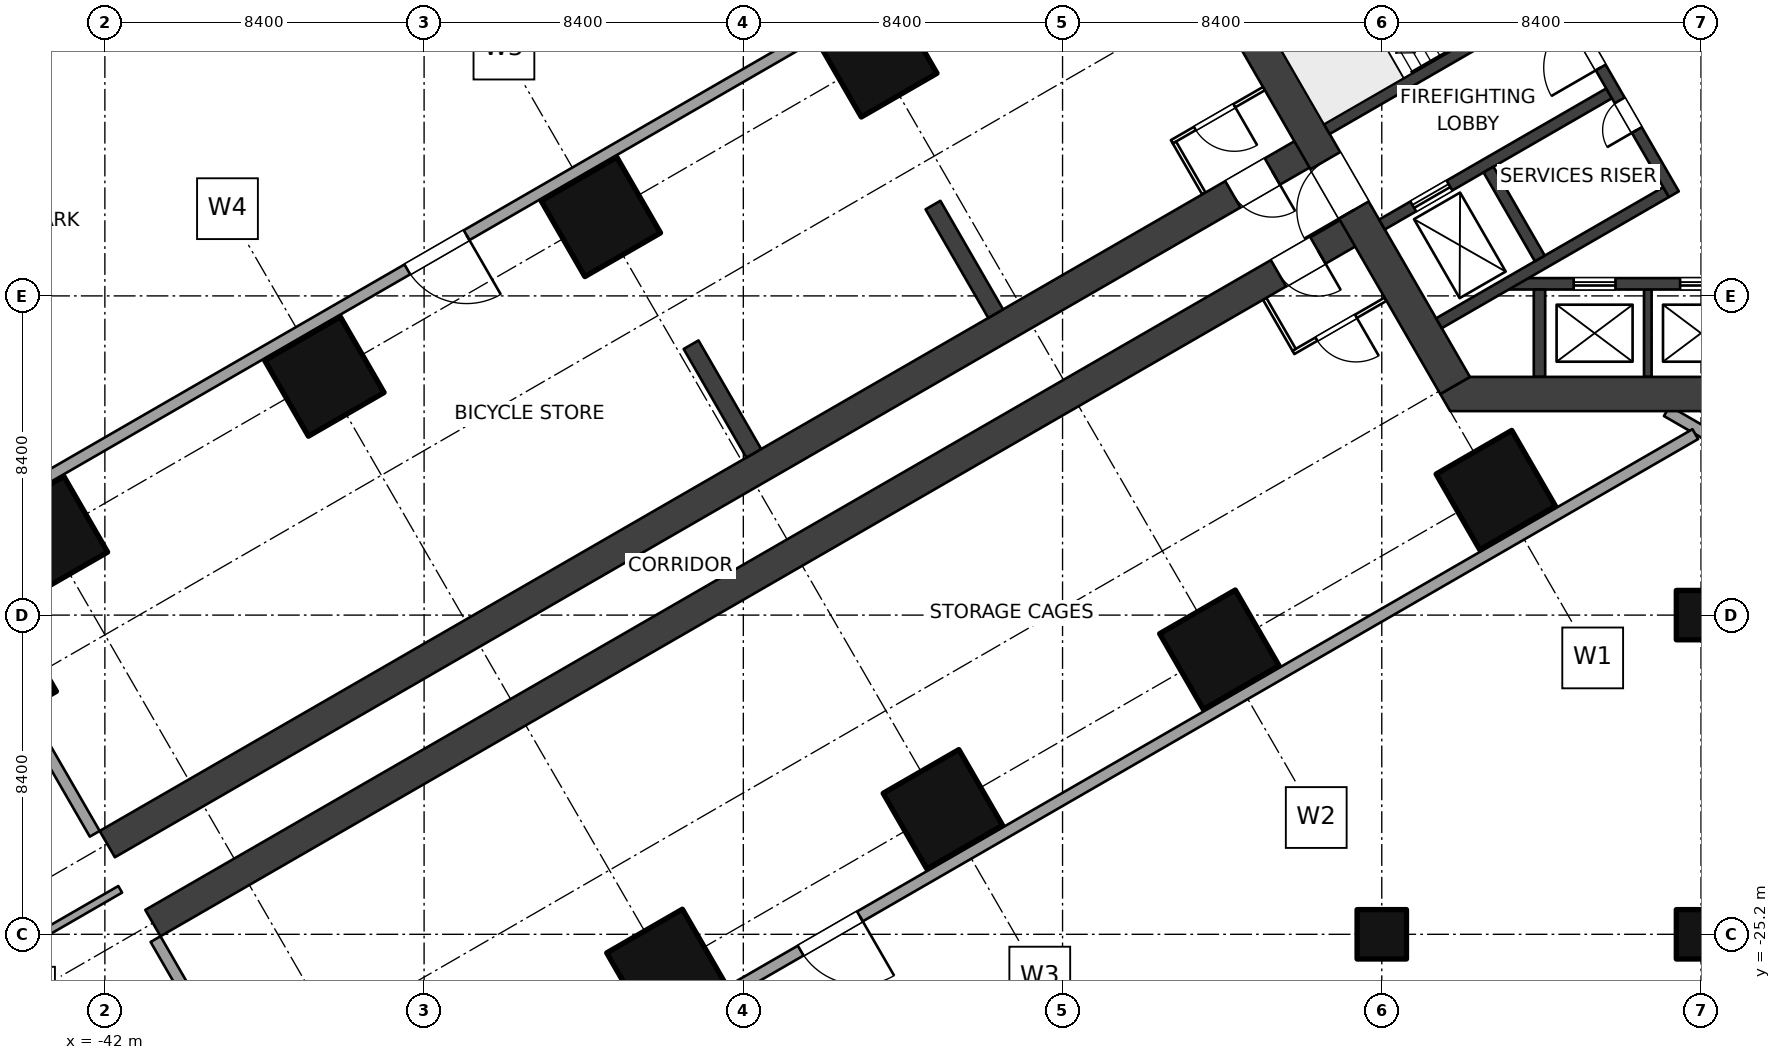
"""IFC4 building model, lengths in metres.
Left out: names, types, materials, properties, quantities, classifications, styles, units other than length and angle.
Written with IfcOpenShell. Run it as: python <this file> out.ifc"""

import sys

from ifc_helpers import new_model, si_unit, direction, frame, frame_2d, origin, origin_2d, place, context, subcontext, project, spatial, polyline, rectangle, outline, extrude, element, fill, save


model = new_model("IFC4")
c1 = context("Model", 3, precision=1e-05, world=origin(), true_north=direction((0.0, 1.0)))
c2 = subcontext(c1, "Body", "Model", "MODEL_VIEW")
j1 = project(units=[si_unit("LENGTHUNIT", "METRE"), si_unit("PLANEANGLEUNIT", "RADIAN")], contexts=[c1])
p1 = place(None, origin())
s1 = spatial("IfcSite", under=j1, at=p1, CompositionType="ELEMENT")
p2 = place(p1, origin())
s2 = spatial("IfcBuilding", under=s1, at=p2, CompositionType="ELEMENT")
p3 = place(p2, frame((0.0, 0.0, -7.0)))
s3 = spatial("IfcBuildingStorey", under=s2, at=p3, CompositionType="ELEMENT", Elevation=-7.0)
for number, where, z_axis, x_axis in (
    (1, (-5.4, -13.51, 0.0), (0.0, 0.0, 1.0), (-0.5, 0.866, 0.0)),
    (2, (-12.675, -17.71, 0.0), (0.0, 0.0, 1.0), (-0.5, 0.866, 0.0)),
    (3, (-21.675, -2.122, 0.0), (0.0, 0.0, 1.0), (-0.5, 0.866, 0.0)),
    (4, (-19.949, -21.91, 0.0), (0.0, 0.0, 1.0), (-0.5, 0.866, 0.0)),
    (5, (-28.949, -6.322, 0.0), (0.0, 0.0, 1.0), (-0.5, 0.866, 0.0)),
    (6, (-27.224, -26.11, 0.0), (0.0, 0.0, 1.0), (-0.5, 0.866, 0.0)),
    (7, (-36.224, -10.521, 0.0), (0.0, 0.0, 1.0), (-0.5, 0.866, 0.0)),
    (8, (-43.499, -14.721, 0.0), (0.0, 0.0, 1.0), (-0.5, 0.866, 0.0)),
):
    element("IfcColumn", number, at=place(p3, frame(where, z_axis=z_axis, x_axis=x_axis)), inside=s3, PredefinedType="COLUMN", context=c2, shape_type="SweptSolid", body=[
        extrude(rectangle(XDim=2.3, YDim=2.3, at=origin_2d()), origin(), (0.0, 0.0, 1.0), 3.5),
    ])
for number, where, z_axis, x_axis in (
    (9, (-44.164, -18.57, 0.0), (0.0, 0.0, 1.0), (-0.5, 0.866, 0.0)),
    (10, (-8.4, -25.2, 0.0), (0.0, 0.0, 1.0), (1.0, 0.0, 0.0)),
    (11, (0.0, -25.2, 0.0), (0.0, 0.0, 1.0), (1.0, 0.0, 0.0)),
    (12, (0.0, -16.8, 0.0), (0.0, 0.0, 1.0), (1.0, 0.0, 0.0)),
):
    element("IfcColumn", number, at=place(p3, frame(where, z_axis=z_axis, x_axis=x_axis)), inside=s3, PredefinedType="COLUMN", context=c2, shape_type="SweptSolid", body=[
        extrude(rectangle(XDim=1.3, YDim=1.3, at=origin_2d()), origin(), (0.0, 0.0, 1.0), 3.5),
    ])
p4 = place(p3, frame((-6.47, -10.757, 0.0), z_axis=(0.0, 0.0, 1.0), x_axis=(-0.499997612506, 0.8660267822, 0.0)))
e13 = element("IfcWall", 13, at=p4, inside=s3, PredefinedType="SHEAR", context=c2, shape_type="SweptSolid", body=[
    extrude(rectangle(XDim=12.161, YDim=0.9, at=frame_2d((6.08, 0.0))), origin(), (0.0, 0.0, 1.0), 3.5),
])
p5 = place(p4, frame((5.33, 0.0, 0.0)))
e14 = element("IfcOpeningElement", 14, at=p5, cuts=e13, PredefinedType="OPENING", context=c2, shape_type="SweptSolid", body=[
    extrude(rectangle(XDim=1.5, YDim=2.1, at=frame_2d((0.75, 1.05))), frame((0.0, 0.46, 0.0), z_axis=(0.0, -1.0, 0.0), x_axis=(1.0, 0.0, 0.0)), (0.0, 0.0, 1.0), 0.92),
])
p6 = place(p3, origin())
e15 = element("IfcWall", 15, at=p6, inside=s3, PredefinedType="SHEAR", context=c2, shape_type="SweptSolid", body=[
    extrude(outline(polyline([(-6.6, -11.432), (6.6, -11.432), (6.86, -10.981), (6.08, -10.531), (-6.08, -10.531), (-6.86, -10.981), (-6.6, -11.432)])), origin(), (0.0, 0.0, 1.0), 3.5),
])
p7 = place(p3, frame((-0.714, -5.724, 0.0), z_axis=(0.0, 0.0, 1.0), x_axis=(-0.499995050369, 0.866028261437, 0.0)))
e16 = element("IfcWall", 16, at=p7, inside=s3, PredefinedType="SHEAR", context=c2, shape_type="SweptSolid", body=[
    extrude(rectangle(XDim=9.2, YDim=0.3, at=frame_2d((4.6, 0.0))), origin(), (0.0, 0.0, 1.0), 3.5),
])
p8 = place(p7, frame((3.85, 0.0, 0.0)))
e17 = element("IfcOpeningElement", 17, at=p8, cuts=e16, PredefinedType="OPENING", context=c2, shape_type="SweptSolid", body=[
    extrude(rectangle(XDim=1.5, YDim=2.1, at=frame_2d((0.75, 1.05))), frame((0.0, 0.16, 0.0), z_axis=(0.0, -1.0, 0.0), x_axis=(1.0, 0.0, 0.0)), (0.0, 0.0, 1.0), 0.32),
])
p9 = place(p7, frame((1.95, 0.0, 0.0)))
e18 = element("IfcOpeningElement", 18, at=p9, cuts=e16, PredefinedType="OPENING", context=c2, shape_type="SweptSolid", body=[
    extrude(rectangle(XDim=0.9, YDim=2.1, at=frame_2d((0.45, 1.05))), frame((0.0, 0.16, 0.0), z_axis=(0.0, -1.0, 0.0), x_axis=(1.0, 0.0, 0.0)), (0.0, 0.0, 1.0), 0.32),
])
p10 = place(p3, frame((-3.869, -0.559, 0.0), z_axis=(0.0, 0.0, 1.0), x_axis=(-0.86602711848, -0.499997030048, 0.0)))
e19 = element("IfcWall", 19, at=p10, inside=s3, PredefinedType="SHEAR", context=c2, shape_type="SweptSolid", body=[
    extrude(rectangle(XDim=6.901, YDim=0.3, at=frame_2d((3.451, 0.0))), origin(), (0.0, 0.0, 1.0), 3.5),
])
p11 = place(p10, frame((0.25, 0.0, 0.0)))
e20 = element("IfcOpeningElement", 20, at=p11, cuts=e19, PredefinedType="OPENING", context=c2, shape_type="SweptSolid", body=[
    extrude(rectangle(XDim=1.0, YDim=2.1, at=frame_2d((0.5, 1.05))), frame((0.0, 0.16, 0.0), z_axis=(0.0, -1.0, 0.0), x_axis=(1.0, 0.0, 0.0)), (0.0, 0.0, 1.0), 0.32),
])
p12 = place(p3, frame((-2.419, -3.071, 0.0), z_axis=(0.0, 0.0, 1.0), x_axis=(-0.86602711848, -0.499997030048, 0.0)))
e21 = element("IfcWall", 21, at=p12, inside=s3, PredefinedType="SHEAR", context=c2, shape_type="SweptSolid", body=[
    extrude(rectangle(XDim=6.901, YDim=0.3, at=frame_2d((3.451, 0.0))), origin(), (0.0, 0.0, 1.0), 3.5),
])
p13 = place(p12, frame((4.85, 0.0, 0.0)))
e22 = element("IfcOpeningElement", 22, at=p13, cuts=e21, PredefinedType="OPENING", context=c2, shape_type="SweptSolid", body=[
    extrude(rectangle(XDim=1.1, YDim=2.1, at=frame_2d((0.55, 1.05))), frame((0.0, 0.16, 0.0), z_axis=(0.0, -1.0, 0.0), x_axis=(1.0, 0.0, 0.0)), (0.0, 0.0, 1.0), 0.32),
])
p14 = place(p3, frame((-0.919, -5.669, 0.0), z_axis=(0.0, 0.0, 1.0), x_axis=(-0.866011800373, -0.500023561059, 0.0)))
e23 = element("IfcWall", 23, at=p14, inside=s3, PredefinedType="SHEAR", context=c2, shape_type="SweptSolid", body=[
    extrude(rectangle(XDim=6.902, YDim=0.3, at=frame_2d((3.451, 0.0))), origin(), (0.0, 0.0, 1.0), 3.5),
])
p15 = place(p3, frame((-4.241, -7.414, 0.0), z_axis=(0.0, 0.0, 1.0), x_axis=(-0.500048589285, 0.86599734893, 0.0)))
e24 = element("IfcWall", 24, at=p15, inside=s3, PredefinedType="SHEAR", context=c2, shape_type="SweptSolid", body=[
    extrude(rectangle(XDim=2.7, YDim=0.3, at=frame_2d((1.35, 0.0))), origin(), (0.0, 0.0, 1.0), 3.5),
])
p16 = place(p3, frame((5.098, -8.082, 0.0), z_axis=(0.0, 0.0, 1.0), x_axis=(-1.0, 0.0, 0.0)))
e25 = element("IfcWall", 25, at=p16, inside=s3, PredefinedType="SHEAR", context=c2, shape_type="SweptSolid", body=[
    extrude(rectangle(XDim=10.195, YDim=0.3, at=frame_2d((5.098, 0.0))), origin(), (0.0, 0.0, 1.0), 3.5),
])
p17 = place(p16, frame((1.748, 0.0, 0.0)))
e26 = element("IfcOpeningElement", 26, at=p17, cuts=e25, PredefinedType="OPENING", context=c2, shape_type="SweptSolid", body=[
    extrude(rectangle(XDim=1.1, YDim=2.1, at=frame_2d((0.55, 1.05))), frame((0.0, 0.16, 0.0), z_axis=(0.0, -1.0, 0.0), x_axis=(1.0, 0.0, 0.0)), (0.0, 0.0, 1.0), 0.32),
])
p18 = place(p16, frame((4.548, 0.0, 0.0)))
e27 = element("IfcOpeningElement", 27, at=p18, cuts=e25, PredefinedType="OPENING", context=c2, shape_type="SweptSolid", body=[
    extrude(rectangle(XDim=1.1, YDim=2.1, at=frame_2d((0.55, 1.05))), frame((0.0, 0.16, 0.0), z_axis=(0.0, -1.0, 0.0), x_axis=(1.0, 0.0, 0.0)), (0.0, 0.0, 1.0), 0.32),
])
p19 = place(p16, frame((7.348, 0.0, 0.0)))
e28 = element("IfcOpeningElement", 28, at=p19, cuts=e25, PredefinedType="OPENING", context=c2, shape_type="SweptSolid", body=[
    extrude(rectangle(XDim=1.1, YDim=2.1, at=frame_2d((0.55, 1.05))), frame((0.0, 0.16, 0.0), z_axis=(0.0, -1.0, 0.0), x_axis=(1.0, 0.0, 0.0)), (0.0, 0.0, 1.0), 0.32),
])
p20 = place(p3, frame((-4.25, -8.231, 0.0), z_axis=(0.0, 0.0, 1.0), x_axis=(0.0, -1.0, 0.0)))
e29 = element("IfcWall", 29, at=p20, inside=s3, PredefinedType="SHEAR", context=c2, shape_type="SweptSolid", body=[
    extrude(rectangle(XDim=2.3, YDim=0.3, at=frame_2d((1.15, 0.0))), origin(), (0.0, 0.0, 1.0), 3.5),
])
p21 = place(p3, frame((-1.4, -8.231, 0.0), z_axis=(0.0, 0.0, 1.0), x_axis=(0.0, -1.0, 0.0)))
e30 = element("IfcWall", 30, at=p21, inside=s3, PredefinedType="SHEAR", context=c2, shape_type="SweptSolid", body=[
    extrude(rectangle(XDim=2.3, YDim=0.2, at=frame_2d((1.15, 0.0))), origin(), (0.0, 0.0, 1.0), 3.5),
])
p22 = place(p3, frame((-8.91, -6.53, 0.0), z_axis=(0.0, 0.0, 1.0), x_axis=(-0.866025284237, -0.500000207062, 0.0)))
e31 = element("IfcWall", 31, at=p22, inside=s3, PredefinedType="SHEAR", context=c2, shape_type="SweptSolid", body=[
    extrude(rectangle(XDim=36.75, YDim=0.8, at=frame_2d((18.375, 0.0))), origin(), (0.0, 0.0, 1.0), 3.5),
])
p23 = place(p22, frame((1.35, 0.0, 0.0)))
e32 = element("IfcOpeningElement", 32, at=p23, cuts=e31, PredefinedType="OPENING", context=c2, shape_type="SweptSolid", body=[
    extrude(rectangle(XDim=1.2, YDim=2.1, at=frame_2d((0.6, 1.05))), frame((0.0, 0.41, 0.0), z_axis=(0.0, -1.0, 0.0), x_axis=(1.0, 0.0, 0.0)), (0.0, 0.0, 1.0), 0.82),
])
p24 = place(p3, frame((-10.11, -4.451, 0.0), z_axis=(0.0, 0.0, 1.0), x_axis=(-0.866025284237, -0.500000207062, 0.0)))
e33 = element("IfcWall", 33, at=p24, inside=s3, PredefinedType="SHEAR", context=c2, shape_type="SweptSolid", body=[
    extrude(rectangle(XDim=36.75, YDim=0.8, at=frame_2d((18.375, 0.0))), origin(), (0.0, 0.0, 1.0), 3.5),
])
p25 = place(p24, frame((1.35, 0.0, 0.0)))
e34 = element("IfcOpeningElement", 34, at=p25, cuts=e33, PredefinedType="OPENING", context=c2, shape_type="SweptSolid", body=[
    extrude(rectangle(XDim=1.2, YDim=2.1, at=frame_2d((0.6, 1.05))), frame((0.0, 0.41, 0.0), z_axis=(0.0, -1.0, 0.0), x_axis=(1.0, 0.0, 0.0)), (0.0, 0.0, 1.0), 0.82),
])
p26 = place(p3, frame((-8.3, -8.487, 0.0), z_axis=(0.0, 0.0, 1.0), x_axis=(-0.866034573852, -0.49998411664, 0.0)))
e35 = element("IfcWall", 35, at=p26, inside=s3, PredefinedType="PARTITIONING", context=c2, shape_type="SweptSolid", body=[
    extrude(rectangle(XDim=2.8, YDim=0.1, at=frame_2d((1.4, 0.0))), origin(), (0.0, 0.0, 1.0), 3.2),
])
p27 = place(p26, frame((0.9, 0.0, 0.0)))
e36 = element("IfcOpeningElement", 36, at=p27, cuts=e35, PredefinedType="OPENING", context=c2, shape_type="SweptSolid", body=[
    extrude(rectangle(XDim=1.2, YDim=2.1, at=frame_2d((0.6, 1.05))), frame((0.0, 0.06, 0.0), z_axis=(0.0, -1.0, 0.0), x_axis=(1.0, 0.0, 0.0)), (0.0, 0.0, 1.0), 0.12),
])
p28 = place(p3, frame((-11.482, -8.476, 0.0), z_axis=(0.0, 0.0, 1.0), x_axis=(0.500017819788, -0.86601511528, 0.0)))
e37 = element("IfcWall", 37, at=p28, inside=s3, PredefinedType="PARTITIONING", context=c2, shape_type="SweptSolid", body=[
    extrude(rectangle(XDim=1.55, YDim=0.1, at=frame_2d((0.775, 0.0))), origin(), (0.0, 0.0, 1.0), 3.2),
])
p29 = place(p3, frame((-11.5, -2.945, 0.0), z_axis=(0.0, 0.0, 1.0), x_axis=(-0.866034573852, -0.49998411664, 0.0)))
e38 = element("IfcWall", 38, at=p29, inside=s3, PredefinedType="PARTITIONING", context=c2, shape_type="SweptSolid", body=[
    extrude(rectangle(XDim=2.8, YDim=0.1, at=frame_2d((1.4, 0.0))), origin(), (0.0, 0.0, 1.0), 3.2),
])
p30 = place(p29, frame((0.9, 0.0, 0.0)))
e39 = element("IfcOpeningElement", 39, at=p30, cuts=e38, PredefinedType="OPENING", context=c2, shape_type="SweptSolid", body=[
    extrude(rectangle(XDim=1.2, YDim=2.1, at=frame_2d((0.6, 1.05))), frame((0.0, 0.06, 0.0), z_axis=(0.0, -1.0, 0.0), x_axis=(1.0, 0.0, 0.0)), (0.0, 0.0, 1.0), 0.12),
])
p31 = place(p3, frame((-13.082, -5.705, 0.0), z_axis=(0.0, 0.0, 1.0), x_axis=(-0.500086022567, 0.865975732936, 0.0)))
e40 = element("IfcWall", 40, at=p31, inside=s3, PredefinedType="PARTITIONING", context=c2, shape_type="SweptSolid", body=[
    extrude(rectangle(XDim=1.55, YDim=0.1, at=frame_2d((0.775, 0.0))), origin(), (0.0, 0.0, 1.0), 3.2),
])
p32 = place(p3, frame((-41.596, -24.016, 0.0), z_axis=(0.0, 0.0, 1.0), x_axis=(-0.866034858292, -0.499983623955, 0.0)))
e41 = element("IfcWall", 41, at=p32, inside=s3, PredefinedType="SOLIDWALL", context=c2, shape_type="SweptSolid", body=[
    extrude(rectangle(XDim=10.627, YDim=0.2, at=frame_2d((5.313, 0.0))), origin(), (0.0, 0.0, 1.0), 3.2),
])
for number, where, z_axis, x_axis in (
    (42, (-40.667, -25.326, 0.0), (0.0, 0.0, 1.0), (0.5, -0.866, 0.0)),
    (43, (-42.267, -22.555, 0.0), (0.0, 0.0, 1.0), (-0.5, 0.866, 0.0)),
):
    element("IfcWall", number, at=place(p3, frame(where, z_axis=z_axis, x_axis=x_axis)), inside=s3, PredefinedType="SOLIDWALL", context=c2, shape_type="SweptSolid", body=[
        extrude(rectangle(XDim=8.6, YDim=0.3, at=frame_2d((4.3, 0.0))), origin(), (0.0, 0.0, 1.0), 1.9),
    ])
p33 = place(p3, frame((-0.15, -12.038, 0.0), z_axis=(0.0, 0.0, 1.0), x_axis=(-0.866026292622, -0.499998460486, 0.0)))
e44 = element("IfcWall", 44, at=p33, inside=s3, PredefinedType="SOLIDWALL", context=c2, shape_type="SweptSolid", body=[
    extrude(rectangle(XDim=41.883, YDim=0.3, at=frame_2d((20.941, 0.0))), origin(), (0.0, 0.0, 1.0), 3.2),
])
p34 = place(p33, frame((25.383, 0.0, 0.0)))
e45 = element("IfcOpeningElement", 45, at=p34, cuts=e44, PredefinedType="OPENING", context=c2, shape_type="SweptSolid", body=[
    extrude(rectangle(XDim=1.8, YDim=2.4, at=frame_2d((0.9, 1.2))), frame((0.0, 0.16, 0.0), z_axis=(0.0, -1.0, 0.0), x_axis=(1.0, 0.0, 0.0)), (0.0, 0.0, 1.0), 0.32),
])
p35 = place(p3, frame((-9.45, 6.495, 0.0), z_axis=(0.0, 0.0, 1.0), x_axis=(-0.866025301493, -0.500000177174, 0.0)))
e46 = element("IfcWall", 46, at=p35, inside=s3, PredefinedType="SOLIDWALL", context=c2, shape_type="SweptSolid", body=[
    extrude(rectangle(XDim=43.095, YDim=0.3, at=frame_2d((21.548, 0.0))), origin(), (0.0, 0.0, 1.0), 3.2),
])
p36 = place(p35, frame((26.595, 0.0, 0.0)))
e47 = element("IfcOpeningElement", 47, at=p36, cuts=e46, PredefinedType="OPENING", context=c2, shape_type="SweptSolid", body=[
    extrude(rectangle(XDim=1.8, YDim=2.4, at=frame_2d((0.9, 1.2))), frame((0.0, 0.16, 0.0), z_axis=(0.0, -1.0, 0.0), x_axis=(1.0, 0.0, 0.0)), (0.0, 0.0, 1.0), 0.32),
])
p37 = place(p3, frame((-0.9, -11.432, 0.0), z_axis=(0.0, 0.0, 1.0), x_axis=(0.866025301493, -0.500000177174, 0.0)))
e48 = element("IfcWall", 48, at=p37, inside=s3, PredefinedType="SOLIDWALL", context=c2, shape_type="SweptSolid", body=[
    extrude(rectangle(XDim=43.095, YDim=0.3, at=frame_2d((21.548, 0.0))), origin(), (0.0, 0.0, 1.0), 3.2),
])
p38 = place(p37, frame((26.595, 0.0, 0.0)))
e49 = element("IfcOpeningElement", 49, at=p38, cuts=e48, PredefinedType="OPENING", context=c2, shape_type="SweptSolid", body=[
    extrude(rectangle(XDim=1.8, YDim=2.4, at=frame_2d((0.9, 1.2))), frame((0.0, 0.16, 0.0), z_axis=(0.0, -1.0, 0.0), x_axis=(1.0, 0.0, 0.0)), (0.0, 0.0, 1.0), 0.32),
])
for number, where, z_axis, x_axis in (
    (50, (-18.559, -8.868, 0.0), (0.0, 0.0, 1.0), (-0.5, 0.866, 0.0)),
    (51, (-24.925, -12.543, 0.0), (0.0, 0.0, 1.0), (-0.5, 0.866, 0.0)),
):
    element("IfcWall", number, at=place(p3, frame(where, z_axis=z_axis, x_axis=x_axis)), inside=s3, PredefinedType="SOLIDWALL", context=c2, shape_type="SweptSolid", body=[
        extrude(rectangle(XDim=3.3, YDim=0.45, at=frame_2d((1.65, 0.0))), origin(), (0.0, 0.0, 1.0), 3.5),
    ])
p39 = place(p18, origin())
e52 = element("IfcDoor", 52, at=p39, inside=s3, OperationType="DOUBLE_DOOR_SLIDING", PredefinedType="DOOR", context=c2, shape_type="SweptSolid", body=[
    extrude(rectangle(XDim=1.1, YDim=2.1, at=frame_2d((0.55, 1.05))), frame((0.0, 0.025, 0.0), z_axis=(0.0, -1.0, 0.0), x_axis=(1.0, 0.0, 0.0)), (0.0, 0.0, 1.0), 0.05),
])
fill(e27, e52)
p40 = place(p19, origin())
e53 = element("IfcDoor", 53, at=p40, inside=s3, OperationType="DOUBLE_DOOR_SLIDING", PredefinedType="DOOR", context=c2, shape_type="SweptSolid", body=[
    extrude(rectangle(XDim=1.1, YDim=2.1, at=frame_2d((0.55, 1.05))), frame((0.0, 0.025, 0.0), z_axis=(0.0, -1.0, 0.0), x_axis=(1.0, 0.0, 0.0)), (0.0, 0.0, 1.0), 0.05),
])
fill(e28, e53)
p41 = place(p13, origin())
e54 = element("IfcDoor", 54, at=p41, inside=s3, OperationType="DOUBLE_DOOR_SLIDING", PredefinedType="DOOR", context=c2, shape_type="SweptSolid", body=[
    extrude(rectangle(XDim=1.1, YDim=2.1, at=frame_2d((0.55, 1.05))), frame((0.0, 0.025, 0.0), z_axis=(0.0, -1.0, 0.0), x_axis=(1.0, 0.0, 0.0)), (0.0, 0.0, 1.0), 0.05),
])
fill(e22, e54)
p42 = place(p8, origin())
e55 = element("IfcDoor", 55, at=p42, inside=s3, OperationType="DOUBLE_DOOR_DOUBLE_SWING", PredefinedType="DOOR", context=c2, shape_type="SweptSolid", body=[
    extrude(rectangle(XDim=1.5, YDim=2.1, at=frame_2d((0.75, 1.05))), frame((0.0, 0.025, 0.0), z_axis=(0.0, -1.0, 0.0), x_axis=(1.0, 0.0, 0.0)), (0.0, 0.0, 1.0), 0.05),
])
fill(e17, e55)
p43 = place(p9, origin())
e56 = element("IfcDoor", 56, at=p43, inside=s3, OperationType="SINGLE_SWING_LEFT", PredefinedType="DOOR", context=c2, shape_type="SweptSolid", body=[
    extrude(rectangle(XDim=0.9, YDim=2.1, at=frame_2d((0.45, 1.05))), frame((0.0, 0.025, 0.0), z_axis=(0.0, -1.0, 0.0), x_axis=(1.0, 0.0, 0.0)), (0.0, 0.0, 1.0), 0.05),
])
fill(e18, e56)
p44 = place(p5, origin())
e57 = element("IfcDoor", 57, at=p44, inside=s3, OperationType="DOUBLE_DOOR_DOUBLE_SWING", PredefinedType="DOOR", context=c2, shape_type="SweptSolid", body=[
    extrude(rectangle(XDim=1.5, YDim=2.1, at=frame_2d((0.75, 1.05))), frame((0.0, 0.025, 0.0), z_axis=(0.0, -1.0, 0.0), x_axis=(1.0, 0.0, 0.0)), (0.0, 0.0, 1.0), 0.05),
])
fill(e14, e57)
p45 = place(p23, origin())
e58 = element("IfcDoor", 58, at=p45, inside=s3, OperationType="DOUBLE_SWING_LEFT", PredefinedType="DOOR", context=c2, shape_type="SweptSolid", body=[
    extrude(rectangle(XDim=1.2, YDim=2.1, at=frame_2d((0.6, 1.05))), frame((0.0, 0.025, 0.0), z_axis=(0.0, -1.0, 0.0), x_axis=(1.0, 0.0, 0.0)), (0.0, 0.0, 1.0), 0.05),
])
fill(e32, e58)
p46 = place(p27, origin())
e59 = element("IfcDoor", 59, at=p46, inside=s3, OperationType="DOUBLE_SWING_LEFT", PredefinedType="DOOR", context=c2, shape_type="SweptSolid", body=[
    extrude(rectangle(XDim=1.2, YDim=2.1, at=frame_2d((0.6, 1.05))), frame((0.0, 0.025, 0.0), z_axis=(0.0, -1.0, 0.0), x_axis=(1.0, 0.0, 0.0)), (0.0, 0.0, 1.0), 0.05),
])
fill(e36, e59)
p47 = place(p25, origin())
e60 = element("IfcDoor", 60, at=p47, inside=s3, OperationType="DOUBLE_SWING_LEFT", PredefinedType="DOOR", context=c2, shape_type="SweptSolid", body=[
    extrude(rectangle(XDim=1.2, YDim=2.1, at=frame_2d((0.6, 1.05))), frame((0.0, 0.025, 0.0), z_axis=(0.0, -1.0, 0.0), x_axis=(1.0, 0.0, 0.0)), (0.0, 0.0, 1.0), 0.05),
])
fill(e34, e60)
p48 = place(p30, origin())
e61 = element("IfcDoor", 61, at=p48, inside=s3, OperationType="DOUBLE_SWING_LEFT", PredefinedType="DOOR", context=c2, shape_type="SweptSolid", body=[
    extrude(rectangle(XDim=1.2, YDim=2.1, at=frame_2d((0.6, 1.05))), frame((0.0, 0.025, 0.0), z_axis=(0.0, -1.0, 0.0), x_axis=(1.0, 0.0, 0.0)), (0.0, 0.0, 1.0), 0.05),
])
fill(e39, e61)
p49 = place(p34, origin())
e62 = element("IfcDoor", 62, at=p49, inside=s3, OperationType="DOUBLE_DOOR_DOUBLE_SWING", PredefinedType="DOOR", context=c2, shape_type="SweptSolid", body=[
    extrude(rectangle(XDim=1.8, YDim=2.4, at=frame_2d((0.9, 1.2))), frame((0.0, 0.025, 0.0), z_axis=(0.0, -1.0, 0.0), x_axis=(1.0, 0.0, 0.0)), (0.0, 0.0, 1.0), 0.05),
])
fill(e45, e62)
p50 = place(p36, origin())
e63 = element("IfcDoor", 63, at=p50, inside=s3, OperationType="DOUBLE_DOOR_DOUBLE_SWING", PredefinedType="DOOR", context=c2, shape_type="SweptSolid", body=[
    extrude(rectangle(XDim=1.8, YDim=2.4, at=frame_2d((0.9, 1.2))), frame((0.0, 0.025, 0.0), z_axis=(0.0, -1.0, 0.0), x_axis=(1.0, 0.0, 0.0)), (0.0, 0.0, 1.0), 0.05),
])
fill(e47, e63)
save(model, sys.argv[1])
